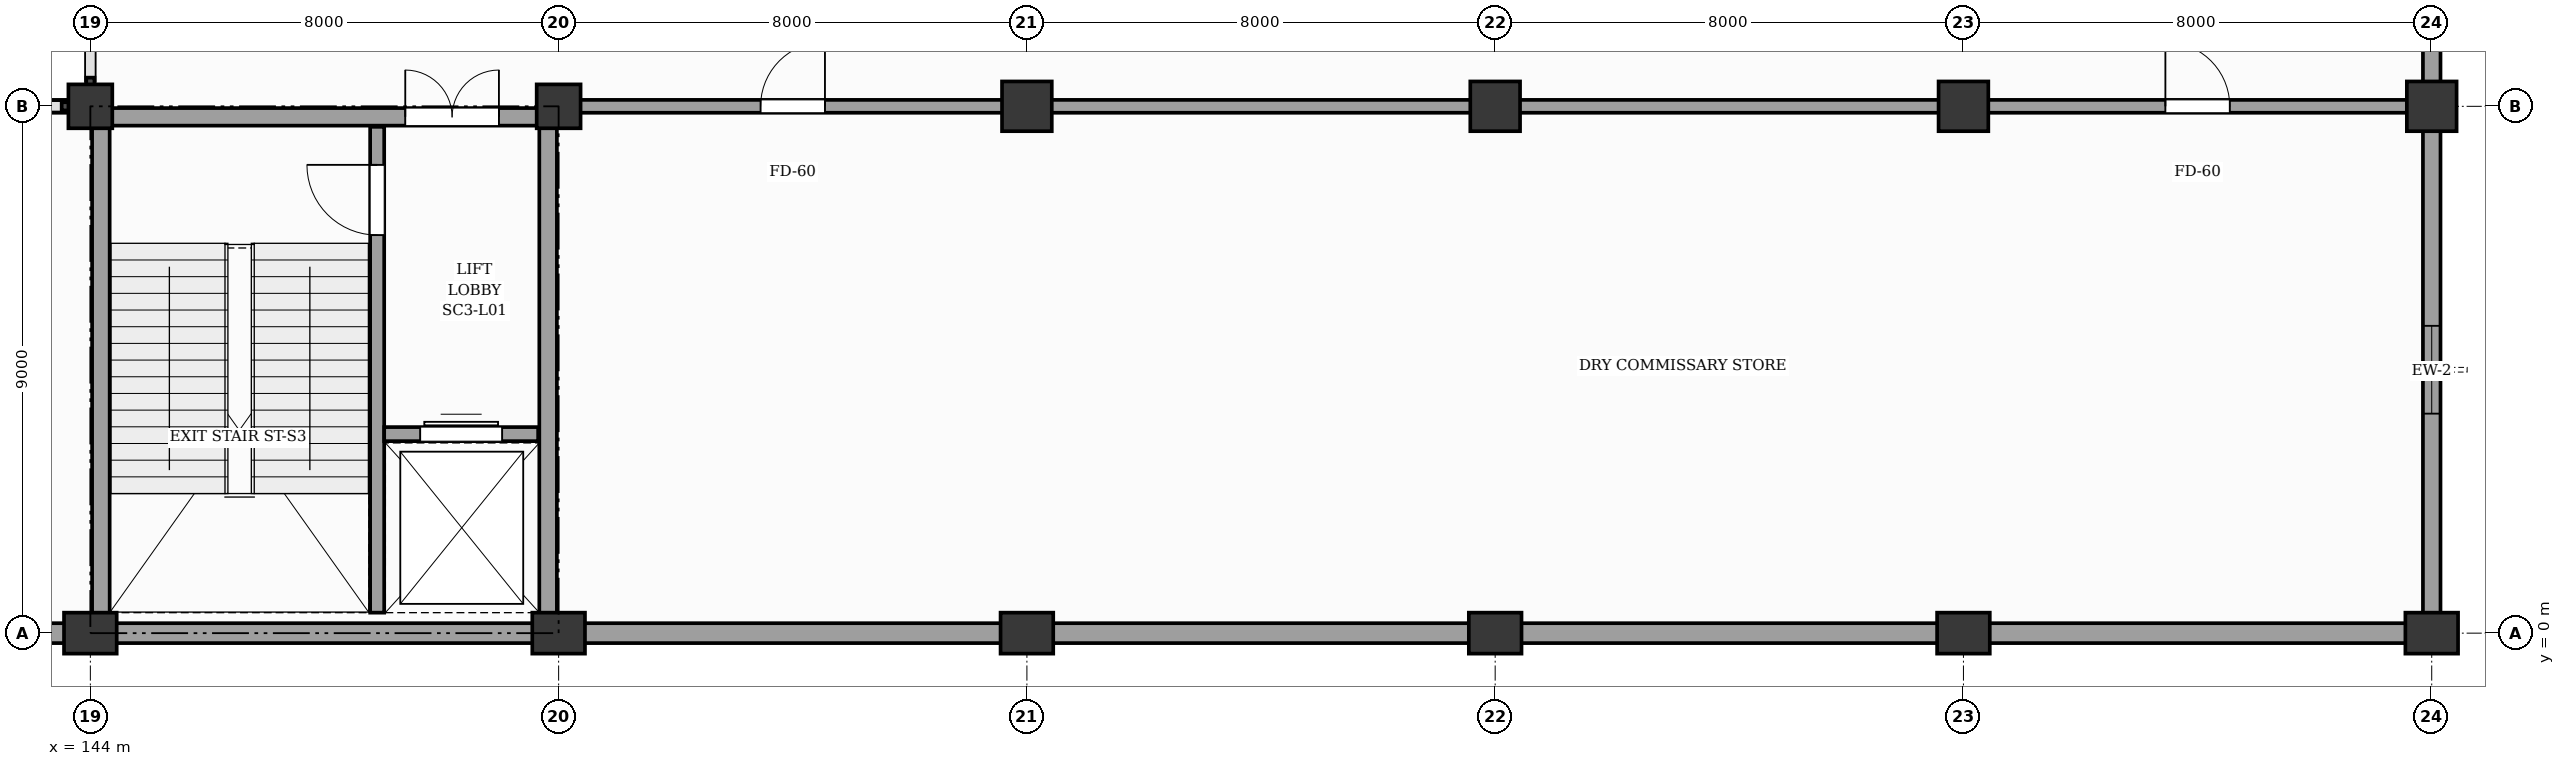
"""IFC4 building model, lengths in metres.
Left out: names, types, materials, properties, quantities, classifications, styles, units other than length and angle.
Written with IfcOpenShell. Run it as: python <this file> out.ifc"""

import sys

from ifc_helpers import new_model, si_unit, direction, frame, frame_2d, origin, origin_2d, place, context, subcontext, project, spatial, rectangle, extrude, element, fill, save


model = new_model("IFC4")
c1 = context("Model", 3, precision=1e-05, world=origin(), true_north=direction((0.0, 1.0)))
c2 = subcontext(c1, "Body", "Model", "MODEL_VIEW")
j1 = project(units=[si_unit("LENGTHUNIT", "METRE"), si_unit("PLANEANGLEUNIT", "RADIAN")], contexts=[c1])
p1 = place(None, origin())
s1 = spatial("IfcSite", under=j1, at=p1, CompositionType="ELEMENT")
p2 = place(p1, origin())
s2 = spatial("IfcBuilding", under=s1, at=p2, CompositionType="ELEMENT")
p3 = place(p2, frame((0.0, 0.0, 4.8)))
s3 = spatial("IfcBuildingStorey", under=s2, at=p3, CompositionType="ELEMENT", Elevation=4.8)
p4 = place(p3, frame((144.0, 0.0, 0.0), z_axis=(0.0, 0.0, 1.0), x_axis=(1.0, 0.0, 0.0)))
e1 = element("IfcColumn", 1, at=p4, inside=s3, PredefinedType="PILASTER", context=c2, shape_type="SweptSolid", body=[
    extrude(rectangle(XDim=0.9, YDim=0.7, at=origin_2d()), origin(), (0.0, 0.0, 1.0), 4.8),
])
p5 = place(p3, frame((144.0, 9.0, 0.0), z_axis=(0.0, 0.0, 1.0), x_axis=(1.0, 0.0, 0.0)))
e2 = element("IfcColumn", 2, at=p5, inside=s3, PredefinedType="COLUMN", context=c2, shape_type="SweptSolid", body=[
    extrude(rectangle(XDim=0.75, YDim=0.75, at=origin_2d()), origin(), (0.0, 0.0, 1.0), 4.8),
])
p6 = place(p3, frame((152.0, 0.0, 0.0), z_axis=(0.0, 0.0, 1.0), x_axis=(1.0, 0.0, 0.0)))
e3 = element("IfcColumn", 3, at=p6, inside=s3, PredefinedType="PILASTER", context=c2, shape_type="SweptSolid", body=[
    extrude(rectangle(XDim=0.9, YDim=0.7, at=origin_2d()), origin(), (0.0, 0.0, 1.0), 4.8),
])
p7 = place(p3, frame((152.0, 9.0, 0.0), z_axis=(0.0, 0.0, 1.0), x_axis=(1.0, 0.0, 0.0)))
e4 = element("IfcColumn", 4, at=p7, inside=s3, PredefinedType="COLUMN", context=c2, shape_type="SweptSolid", body=[
    extrude(rectangle(XDim=0.75, YDim=0.75, at=origin_2d()), origin(), (0.0, 0.0, 1.0), 4.8),
])
p8 = place(p3, frame((160.0, 0.0, 0.0), z_axis=(0.0, 0.0, 1.0), x_axis=(1.0, 0.0, 0.0)))
e5 = element("IfcColumn", 5, at=p8, inside=s3, PredefinedType="PILASTER", context=c2, shape_type="SweptSolid", body=[
    extrude(rectangle(XDim=0.9, YDim=0.7, at=origin_2d()), origin(), (0.0, 0.0, 1.0), 4.8),
])
p9 = place(p3, frame((160.0, 9.0, 0.0), z_axis=(0.0, 0.0, 1.0), x_axis=(1.0, 0.0, 0.0)))
e6 = element("IfcColumn", 6, at=p9, inside=s3, PredefinedType="COLUMN", context=c2, shape_type="SweptSolid", body=[
    extrude(rectangle(XDim=0.85, YDim=0.85, at=origin_2d()), origin(), (0.0, 0.0, 1.0), 4.8),
])
p10 = place(p3, frame((168.0, 0.0, 0.0), z_axis=(0.0, 0.0, 1.0), x_axis=(1.0, 0.0, 0.0)))
e7 = element("IfcColumn", 7, at=p10, inside=s3, PredefinedType="PILASTER", context=c2, shape_type="SweptSolid", body=[
    extrude(rectangle(XDim=0.9, YDim=0.7, at=origin_2d()), origin(), (0.0, 0.0, 1.0), 4.8),
])
p11 = place(p3, frame((168.0, 9.0, 0.0), z_axis=(0.0, 0.0, 1.0), x_axis=(1.0, 0.0, 0.0)))
e8 = element("IfcColumn", 8, at=p11, inside=s3, PredefinedType="COLUMN", context=c2, shape_type="SweptSolid", body=[
    extrude(rectangle(XDim=0.85, YDim=0.85, at=origin_2d()), origin(), (0.0, 0.0, 1.0), 4.8),
])
p12 = place(p3, frame((176.0, 0.0, 0.0), z_axis=(0.0, 0.0, 1.0), x_axis=(1.0, 0.0, 0.0)))
e9 = element("IfcColumn", 9, at=p12, inside=s3, PredefinedType="PILASTER", context=c2, shape_type="SweptSolid", body=[
    extrude(rectangle(XDim=0.9, YDim=0.7, at=origin_2d()), origin(), (0.0, 0.0, 1.0), 4.8),
])
p13 = place(p3, frame((176.0, 9.0, 0.0), z_axis=(0.0, 0.0, 1.0), x_axis=(1.0, 0.0, 0.0)))
e10 = element("IfcColumn", 10, at=p13, inside=s3, PredefinedType="COLUMN", context=c2, shape_type="SweptSolid", body=[
    extrude(rectangle(XDim=0.85, YDim=0.85, at=origin_2d()), origin(), (0.0, 0.0, 1.0), 4.8),
])
p14 = place(p3, frame((184.0, 0.0, 0.0), z_axis=(0.0, 0.0, 1.0), x_axis=(1.0, 0.0, 0.0)))
e11 = element("IfcColumn", 11, at=p14, inside=s3, PredefinedType="PILASTER", context=c2, shape_type="SweptSolid", body=[
    extrude(rectangle(XDim=0.9, YDim=0.7, at=origin_2d()), origin(), (0.0, 0.0, 1.0), 4.8),
])
p15 = place(p3, frame((184.0, 9.0, 0.0), z_axis=(0.0, 0.0, 1.0), x_axis=(1.0, 0.0, 0.0)))
e12 = element("IfcColumn", 12, at=p15, inside=s3, PredefinedType="COLUMN", context=c2, shape_type="SweptSolid", body=[
    extrude(rectangle(XDim=0.85, YDim=0.85, at=origin_2d()), origin(), (0.0, 0.0, 1.0), 4.8),
])
for number, where, z_axis, x_axis in (
    (13, (136.4, 0.0, 0.0), (0.0, 0.0, 1.0), (1.0, 0.0, 0.0)),
    (14, (144.4, 0.0, 0.0), (0.0, 0.0, 1.0), (1.0, 0.0, 0.0)),
    (15, (152.4, 0.0, 0.0), (0.0, 0.0, 1.0), (1.0, 0.0, 0.0)),
    (16, (160.4, 0.0, 0.0), (0.0, 0.0, 1.0), (1.0, 0.0, 0.0)),
    (17, (168.4, 0.0, 0.0), (0.0, 0.0, 1.0), (1.0, 0.0, 0.0)),
    (18, (176.4, 0.0, 0.0), (0.0, 0.0, 1.0), (1.0, 0.0, 0.0)),
):
    element("IfcWall", number, at=place(p3, frame(where, z_axis=z_axis, x_axis=x_axis)), inside=s3, PredefinedType="SOLIDWALL", context=c2, shape_type="SweptSolid", body=[
        extrude(rectangle(XDim=7.2, YDim=0.34, at=frame_2d((3.6, 0.0))), origin(), (0.0, 0.0, 1.0), 3.84),
    ])
p16 = place(p3, frame((184.0, 0.345, 0.0), z_axis=(0.0, 0.0, 1.0), x_axis=(0.0, 1.0, 0.0)))
e19 = element("IfcWall", 19, at=p16, inside=s3, PredefinedType="SOLIDWALL", context=c2, shape_type="SweptSolid", body=[
    extrude(rectangle(XDim=8.255, YDim=0.3, at=frame_2d((4.127, 0.0))), origin(), (0.0, 0.0, 1.0), 3.66),
])
p17 = place(p16, frame((3.405, 0.0, 0.95)))
e20 = element("IfcOpeningElement", 20, at=p17, cuts=e19, PredefinedType="OPENING", context=c2, shape_type="SweptSolid", body=[
    extrude(rectangle(XDim=1.5, YDim=1.9, at=frame_2d((0.75, 0.95))), frame((0.0, 0.16, 0.0), z_axis=(0.0, -1.0, 0.0), x_axis=(1.0, 0.0, 0.0)), (0.0, 0.0, 1.0), 0.32),
])
p18 = place(p3, frame((184.0, 9.4, 0.0), z_axis=(0.0, 0.0, 1.0), x_axis=(0.0, 1.0, 0.0)))
e21 = element("IfcWall", 21, at=p18, inside=s3, PredefinedType="SOLIDWALL", context=c2, shape_type="SweptSolid", body=[
    extrude(rectangle(XDim=8.2, YDim=0.3, at=frame_2d((4.1, 0.0))), origin(), (0.0, 0.0, 1.0), 3.66),
])
p19 = place(p18, frame((3.35, 0.0, 0.95)))
e22 = element("IfcOpeningElement", 22, at=p19, cuts=e21, PredefinedType="OPENING", context=c2, shape_type="SweptSolid", body=[
    extrude(rectangle(XDim=1.5, YDim=1.9, at=frame_2d((0.75, 0.95))), frame((0.0, 0.16, 0.0), z_axis=(0.0, -1.0, 0.0), x_axis=(1.0, 0.0, 0.0)), (0.0, 0.0, 1.0), 0.32),
])
p20 = place(p3, frame((148.9, 0.35, 0.0), z_axis=(0.0, 0.0, 1.0), x_axis=(0.0, 1.0, 0.0)))
e23 = element("IfcWall", 23, at=p20, inside=s3, PredefinedType="SHEAR", context=c2, shape_type="SweptSolid", body=[
    extrude(rectangle(XDim=8.3, YDim=0.24, at=frame_2d((4.15, 0.0))), origin(), (0.0, 0.0, 1.0), 4.52),
])
p21 = place(p20, frame((6.45, 0.0, 0.0)))
e24 = element("IfcOpeningElement", 24, at=p21, cuts=e23, PredefinedType="OPENING", context=c2, shape_type="SweptSolid", body=[
    extrude(rectangle(XDim=1.2, YDim=2.15, at=frame_2d((0.6, 1.075))), frame((0.0, 0.13, 0.0), z_axis=(0.0, -1.0, 0.0), x_axis=(1.0, 0.0, 0.0)), (0.0, 0.0, 1.0), 0.26),
])
p22 = place(p3, frame((149.02, 3.4, 0.0), z_axis=(0.0, 0.0, 1.0), x_axis=(1.0, 0.0, 0.0)))
e25 = element("IfcWall", 25, at=p22, inside=s3, PredefinedType="SHEAR", context=c2, shape_type="SweptSolid", body=[
    extrude(rectangle(XDim=2.63, YDim=0.24, at=frame_2d((1.315, 0.0))), origin(), (0.0, 0.0, 1.0), 4.52),
])
p23 = place(p22, frame((0.615, 0.0, 0.0)))
e26 = element("IfcOpeningElement", 26, at=p23, cuts=e25, PredefinedType="OPENING", context=c2, shape_type="SweptSolid", body=[
    extrude(rectangle(XDim=1.4, YDim=2.15, at=frame_2d((0.7, 1.075))), frame((0.0, 0.13, 0.0), z_axis=(0.0, -1.0, 0.0), x_axis=(1.0, 0.0, 0.0)), (0.0, 0.0, 1.0), 0.26),
])
for number, where, z_axis, x_axis in (
    (27, (144.18, 0.18, 0.0), (0.0, 0.0, 1.0), (0.0, 1.0, 0.0)),
    (28, (151.82, 0.18, 0.0), (0.0, 0.0, 1.0), (0.0, 1.0, 0.0)),
):
    element("IfcWall", number, at=place(p3, frame(where, z_axis=z_axis, x_axis=x_axis)), inside=s3, PredefinedType="SHEAR", context=c2, shape_type="SweptSolid", body=[
        extrude(rectangle(XDim=8.64, YDim=0.3, at=frame_2d((4.32, 0.0))), origin(), (0.0, 0.0, 1.0), 4.52),
    ])
p24 = place(p3, frame((144.03, 8.82, 0.0), z_axis=(0.0, 0.0, 1.0), x_axis=(1.0, 0.0, 0.0)))
e29 = element("IfcWall", 29, at=p24, inside=s3, PredefinedType="SHEAR", context=c2, shape_type="SweptSolid", body=[
    extrude(rectangle(XDim=7.94, YDim=0.3, at=frame_2d((3.97, 0.0))), origin(), (0.0, 0.0, 1.0), 4.52),
])
p25 = place(p24, frame((5.35, 0.0, 0.0)))
e30 = element("IfcOpeningElement", 30, at=p25, cuts=e29, PredefinedType="OPENING", context=c2, shape_type="SweptSolid", body=[
    extrude(rectangle(XDim=1.6, YDim=2.15, at=frame_2d((0.8, 1.075))), frame((0.0, 0.16, 0.0), z_axis=(0.0, -1.0, 0.0), x_axis=(1.0, 0.0, 0.0)), (0.0, 0.0, 1.0), 0.32),
])
p26 = place(p3, frame((136.3, 9.0, 0.0), z_axis=(0.0, 0.0, 1.0), x_axis=(1.0, 0.0, 0.0)))
e31 = element("IfcWall", 31, at=p26, inside=s3, PredefinedType="SOLIDWALL", context=c2, shape_type="SweptSolid", body=[
    extrude(rectangle(XDim=7.4, YDim=0.22, at=frame_2d((3.7, 0.0))), origin(), (0.0, 0.0, 1.0), 3.66),
])
p27 = place(p3, frame((152.3, 9.0, 0.0), z_axis=(0.0, 0.0, 1.0), x_axis=(1.0, 0.0, 0.0)))
e32 = element("IfcWall", 32, at=p27, inside=s3, PredefinedType="SOLIDWALL", context=c2, shape_type="SweptSolid", body=[
    extrude(rectangle(XDim=7.4, YDim=0.22, at=frame_2d((3.7, 0.0))), origin(), (0.0, 0.0, 1.0), 3.66),
])
p28 = place(p27, frame((3.15, 0.0, 0.0)))
e33 = element("IfcOpeningElement", 33, at=p28, cuts=e32, PredefinedType="OPENING", context=c2, shape_type="SweptSolid", body=[
    extrude(rectangle(XDim=1.1, YDim=2.15, at=frame_2d((0.55, 1.075))), frame((0.0, 0.12, 0.0), z_axis=(0.0, -1.0, 0.0), x_axis=(1.0, 0.0, 0.0)), (0.0, 0.0, 1.0), 0.24),
])
for number, where, z_axis, x_axis in (
    (34, (160.3, 9.0, 0.0), (0.0, 0.0, 1.0), (1.0, 0.0, 0.0)),
    (35, (168.3, 9.0, 0.0), (0.0, 0.0, 1.0), (1.0, 0.0, 0.0)),
):
    element("IfcWall", number, at=place(p3, frame(where, z_axis=z_axis, x_axis=x_axis)), inside=s3, PredefinedType="SOLIDWALL", context=c2, shape_type="SweptSolid", body=[
        extrude(rectangle(XDim=7.4, YDim=0.22, at=frame_2d((3.7, 0.0))), origin(), (0.0, 0.0, 1.0), 3.66),
    ])
p29 = place(p3, frame((176.3, 9.0, 0.0), z_axis=(0.0, 0.0, 1.0), x_axis=(1.0, 0.0, 0.0)))
e36 = element("IfcWall", 36, at=p29, inside=s3, PredefinedType="SOLIDWALL", context=c2, shape_type="SweptSolid", body=[
    extrude(rectangle(XDim=7.4, YDim=0.22, at=frame_2d((3.7, 0.0))), origin(), (0.0, 0.0, 1.0), 3.66),
])
p30 = place(p29, frame((3.15, 0.0, 0.0)))
e37 = element("IfcOpeningElement", 37, at=p30, cuts=e36, PredefinedType="OPENING", context=c2, shape_type="SweptSolid", body=[
    extrude(rectangle(XDim=1.1, YDim=2.15, at=frame_2d((0.55, 1.075))), frame((0.0, 0.12, 0.0), z_axis=(0.0, -1.0, 0.0), x_axis=(1.0, 0.0, 0.0)), (0.0, 0.0, 1.0), 0.24),
])
p31 = place(p17, origin())
e38 = element("IfcWindow", 38, at=p31, inside=s3, PartitioningType="SINGLE_PANEL", PredefinedType="WINDOW", context=c2, shape_type="SweptSolid", body=[
    extrude(rectangle(XDim=1.5, YDim=1.9, at=frame_2d((0.75, 0.95))), frame((0.0, 0.03, 0.0), z_axis=(0.0, -1.0, 0.0), x_axis=(1.0, 0.0, 0.0)), (0.0, 0.0, 1.0), 0.06),
])
fill(e20, e38)
p32 = place(p21, origin())
e39 = element("IfcDoor", 39, at=p32, inside=s3, OperationType="SINGLE_SWING_RIGHT", PredefinedType="DOOR", context=c2, shape_type="SweptSolid", body=[
    extrude(rectangle(XDim=1.2, YDim=2.15, at=frame_2d((0.6, 1.075))), frame((0.0, 0.025, 0.0), z_axis=(0.0, -1.0, 0.0), x_axis=(1.0, 0.0, 0.0)), (0.0, 0.0, 1.0), 0.05),
])
fill(e24, e39)
p33 = place(p23, origin())
e40 = element("IfcDoor", 40, at=p33, inside=s3, OperationType="DOUBLE_DOOR_SLIDING", PredefinedType="DOOR", context=c2, shape_type="SweptSolid", body=[
    extrude(rectangle(XDim=1.4, YDim=2.15, at=frame_2d((0.7, 1.075))), frame((0.0, 0.025, 0.0), z_axis=(0.0, -1.0, 0.0), x_axis=(1.0, 0.0, 0.0)), (0.0, 0.0, 1.0), 0.05),
])
fill(e26, e40)
p34 = place(p25, origin())
e41 = element("IfcDoor", 41, at=p34, inside=s3, OperationType="DOUBLE_DOOR_SINGLE_SWING", PredefinedType="DOOR", context=c2, shape_type="SweptSolid", body=[
    extrude(rectangle(XDim=1.6, YDim=2.15, at=frame_2d((0.8, 1.075))), frame((0.0, 0.025, 0.0), z_axis=(0.0, -1.0, 0.0), x_axis=(1.0, 0.0, 0.0)), (0.0, 0.0, 1.0), 0.05),
])
fill(e30, e41)
p35 = place(p28, origin())
e42 = element("IfcDoor", 42, at=p35, inside=s3, OperationType="SINGLE_SWING_RIGHT", PredefinedType="DOOR", context=c2, shape_type="SweptSolid", body=[
    extrude(rectangle(XDim=1.1, YDim=2.15, at=frame_2d((0.55, 1.075))), frame((0.0, 0.025, 0.0), z_axis=(0.0, -1.0, 0.0), x_axis=(1.0, 0.0, 0.0)), (0.0, 0.0, 1.0), 0.05),
])
fill(e33, e42)
p36 = place(p30, origin())
e43 = element("IfcDoor", 43, at=p36, inside=s3, OperationType="SINGLE_SWING_LEFT", PredefinedType="DOOR", context=c2, shape_type="SweptSolid", body=[
    extrude(rectangle(XDim=1.1, YDim=2.15, at=frame_2d((0.55, 1.075))), frame((0.0, 0.025, 0.0), z_axis=(0.0, -1.0, 0.0), x_axis=(1.0, 0.0, 0.0)), (0.0, 0.0, 1.0), 0.05),
])
fill(e37, e43)
save(model, sys.argv[1])
